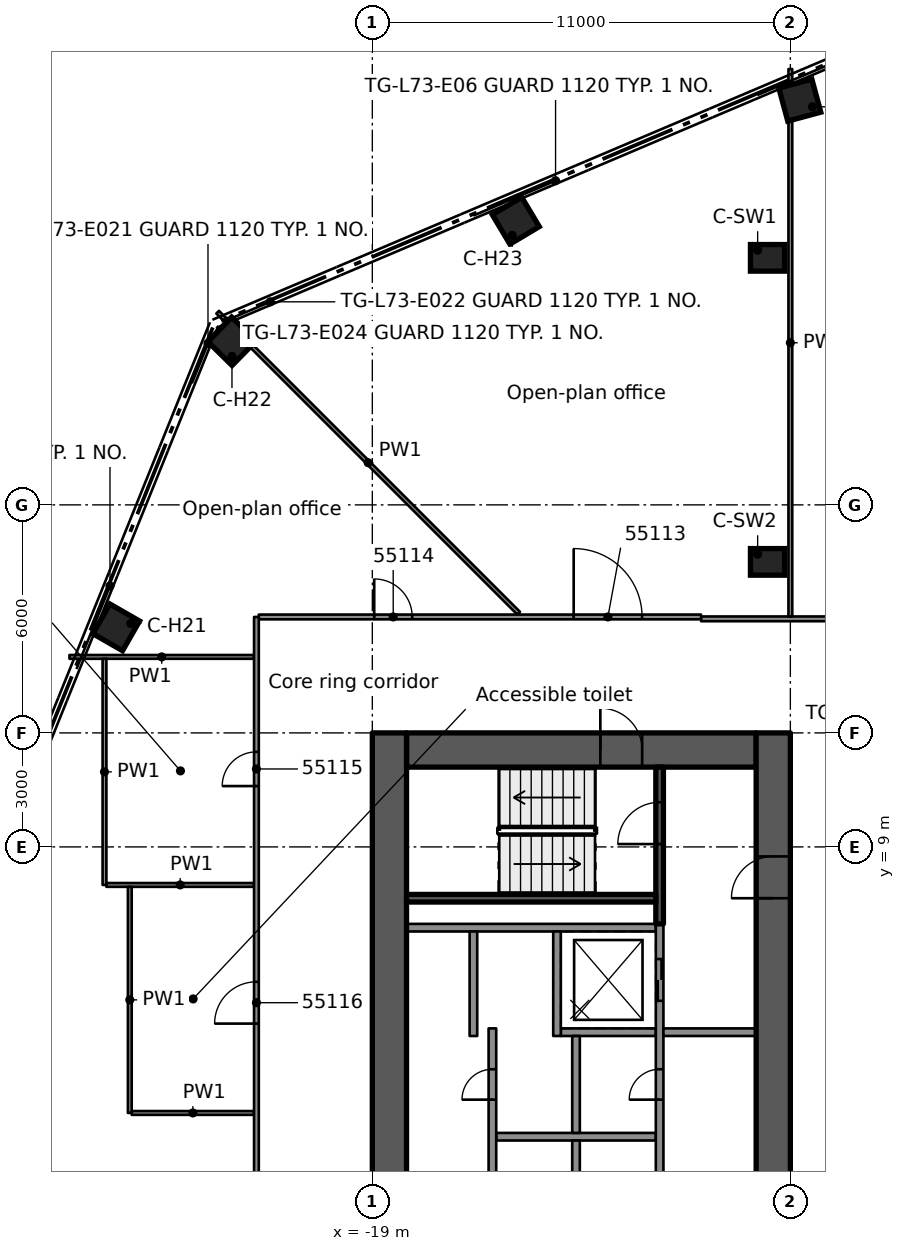
"""IFC4 building model, lengths in metres.
Left out: names, types, materials, properties, quantities, classifications, styles, units other than length and angle.
Written with IfcOpenShell. Run it as: python <this file> out.ifc"""

import sys

from ifc_helpers import new_model, si_unit, direction, frame, frame_2d, origin, origin_2d, place, context, subcontext, project, spatial, rectangle, extrude, element, fill, save


model = new_model("IFC4")
c1 = context("Model", 3, precision=1e-05, world=origin(), true_north=direction((0.0, 1.0)))
c2 = subcontext(c1, "Body", "Model", "MODEL_VIEW")
j1 = project(units=[si_unit("LENGTHUNIT", "METRE"), si_unit("PLANEANGLEUNIT", "RADIAN")], contexts=[c1])
p1 = place(None, origin())
s1 = spatial("IfcSite", under=j1, at=p1, CompositionType="ELEMENT")
p2 = place(p1, origin())
s2 = spatial("IfcBuilding", under=s1, at=p2, CompositionType="ELEMENT")
p3 = place(p2, frame((0.0, 0.0, 275.4)))
s3 = spatial("IfcBuildingStorey", under=s2, at=p3, CompositionType="ELEMENT", Elevation=275.4)
p4 = place(p3, frame((-18.1, 11.55, 0.0), z_axis=(0.0, 0.0, 1.0), x_axis=(1.0, 0.0, 0.0)))
e1 = element("IfcWall", 1, at=p4, inside=s3, PredefinedType="SHEAR", context=c2, shape_type="SweptSolid", body=[
    extrude(rectangle(XDim=9.2, YDim=0.9, at=frame_2d((4.6, 0.0))), origin(), (0.0, 0.0, 1.0), 3.5),
])
p5 = place(p4, frame((5.1, 0.0, 0.0)))
e2 = element("IfcOpeningElement", 2, at=p5, cuts=e1, PredefinedType="OPENING", context=c2, shape_type="SweptSolid", body=[
    extrude(rectangle(XDim=1.1, YDim=2.1, at=frame_2d((0.55, 1.05))), frame((0.0, 0.46, 0.0), z_axis=(0.0, -1.0, 0.0), x_axis=(1.0, 0.0, 0.0)), (0.0, 0.0, 1.0), 0.92),
])
p6 = place(p3, frame((-18.55, -12.0, 0.0), z_axis=(0.0, 0.0, 1.0), x_axis=(0.0, 1.0, 0.0)))
e3 = element("IfcWall", 3, at=p6, inside=s3, PredefinedType="SHEAR", context=c2, shape_type="SweptSolid", body=[
    extrude(rectangle(XDim=24.0, YDim=0.9, at=frame_2d((12.0, 0.0))), origin(), (0.0, 0.0, 1.0), 3.5),
])
p7 = place(p6, frame((10.1, 0.0, 0.0)))
e4 = element("IfcOpeningElement", 4, at=p7, cuts=e3, PredefinedType="OPENING", context=c2, shape_type="SweptSolid", body=[
    extrude(rectangle(XDim=1.8, YDim=2.1, at=frame_2d((0.9, 1.05))), frame((0.0, 0.46, 0.0), z_axis=(0.0, -1.0, 0.0), x_axis=(1.0, 0.0, 0.0)), (0.0, 0.0, 1.0), 0.92),
])
p8 = place(p3, frame((-8.45, -12.0, 0.0), z_axis=(0.0, 0.0, 1.0), x_axis=(0.0, 1.0, 0.0)))
e5 = element("IfcWall", 5, at=p8, inside=s3, PredefinedType="SHEAR", context=c2, shape_type="SweptSolid", body=[
    extrude(rectangle(XDim=24.0, YDim=0.9, at=frame_2d((12.0, 0.0))), origin(), (0.0, 0.0, 1.0), 3.5),
])
p9 = place(p8, frame((9.6, 0.0, 0.0)))
e6 = element("IfcOpeningElement", 6, at=p9, cuts=e5, PredefinedType="OPENING", context=c2, shape_type="SweptSolid", body=[
    extrude(rectangle(XDim=1.8, YDim=2.1, at=frame_2d((0.9, 1.05))), frame((0.0, 0.46, 0.0), z_axis=(0.0, -1.0, 0.0), x_axis=(1.0, 0.0, 0.0)), (0.0, 0.0, 1.0), 0.92),
])
p10 = place(p8, frame((19.65, 0.0, 0.0)))
e7 = element("IfcOpeningElement", 7, at=p10, cuts=e5, PredefinedType="OPENING", context=c2, shape_type="SweptSolid", body=[
    extrude(rectangle(XDim=1.1, YDim=2.1, at=frame_2d((0.55, 1.05))), frame((0.0, 0.46, 0.0), z_axis=(0.0, -1.0, 0.0), x_axis=(1.0, 0.0, 0.0)), (0.0, 0.0, 1.0), 0.92),
])
p11 = place(p8, frame((2.2, 0.0, 0.0)))
e8 = element("IfcOpeningElement", 8, at=p11, cuts=e5, PredefinedType="OPENING", context=c2, shape_type="SweptSolid", body=[
    extrude(rectangle(XDim=0.8, YDim=2.1, at=frame_2d((0.4, 1.05))), frame((0.0, 0.46, 0.0), z_axis=(0.0, -1.0, 0.0), x_axis=(1.0, 0.0, 0.0)), (0.0, 0.0, 1.0), 0.92),
])
for number, where, z_axis, x_axis in (
    (9, (-25.739, 14.777, 0.0), (0.0, 0.0, 1.0), (-0.867, 0.498, 0.0)),
    (10, (-22.697, 22.305, 0.0), (0.0, 0.0, 1.0), (-0.713, 0.701, 0.0)),
    (11, (-15.224, 25.477, 0.0), (0.0, 0.0, 1.0), (-0.513, 0.858, 0.0)),
    (12, (-7.751, 28.649, 0.0), (0.0, 0.0, 1.0), (-0.261, 0.965, 0.0)),
):
    element("IfcColumn", number, at=place(p3, frame(where, z_axis=z_axis, x_axis=x_axis)), inside=s3, PredefinedType="COLUMN", context=c2, shape_type="SweptSolid", body=[
        extrude(rectangle(XDim=0.9, YDim=0.9, at=origin_2d()), origin(), (0.0, 0.0, 1.0), 3.5),
    ])
for number, where, z_axis, x_axis in (
    (13, (-8.6, 24.5, 0.0), (0.0, 0.0, 1.0), (1.0, 0.0, 0.0)),
    (14, (-8.6, 16.5, 0.0), (0.0, 0.0, 1.0), (1.0, 0.0, 0.0)),
):
    element("IfcColumn", number, at=place(p3, frame(where, z_axis=z_axis, x_axis=x_axis)), inside=s3, PredefinedType="COLUMN", context=c2, shape_type="SweptSolid", body=[
        extrude(rectangle(XDim=0.9, YDim=0.7, at=origin_2d()), origin(), (0.0, 0.0, 1.0), 3.5),
    ])
p12 = place(p3, frame((-11.54, 6.875, 0.0), z_axis=(0.0, 0.0, 1.0), x_axis=(-1.0, 0.0, 0.0)))
e15 = element("IfcWall", 15, at=p12, inside=s3, PredefinedType="SOLIDWALL", context=c2, shape_type="SweptSolid", body=[
    extrude(rectangle(XDim=6.56, YDim=0.2, at=frame_2d((3.28, 0.0))), origin(), (0.0, 0.0, 1.0), 3.09),
])
p13 = place(p3, frame((-11.54, 1.375, 0.0), z_axis=(0.0, 0.0, 1.0), x_axis=(-1.0, 0.0, 0.0)))
e16 = element("IfcWall", 16, at=p13, inside=s3, PredefinedType="SOLIDWALL", context=c2, shape_type="SweptSolid", body=[
    extrude(rectangle(XDim=4.2, YDim=0.2, at=frame_2d((2.1, 0.0))), origin(), (0.0, 0.0, 1.0), 3.09),
])
p14 = place(p3, frame((-11.54, 4.125, 0.0), z_axis=(0.0, 0.0, 1.0), x_axis=(-1.0, 0.0, 0.0)))
e17 = element("IfcWall", 17, at=p14, inside=s3, PredefinedType="SOLIDWALL", context=c2, shape_type="SweptSolid", body=[
    extrude(rectangle(XDim=2.5, YDim=0.2, at=frame_2d((1.25, 0.0))), origin(), (0.0, 0.0, 1.0), 3.09),
])
p15 = place(p3, frame((-11.44, -6.975, 0.0), z_axis=(0.0, 0.0, 1.0), x_axis=(0.0, 1.0, 0.0)))
e18 = element("IfcWall", 18, at=p15, inside=s3, PredefinedType="SOLIDWALL", context=c2, shape_type="SweptSolid", body=[
    extrude(rectangle(XDim=13.95, YDim=0.2, at=frame_2d((6.975, 0.0))), origin(), (0.0, 0.0, 1.0), 3.09),
])
p16 = place(p15, frame((0.925, 0.0, 0.0)))
e19 = element("IfcOpeningElement", 19, at=p16, cuts=e18, PredefinedType="OPENING", context=c2, shape_type="SweptSolid", body=[
    extrude(rectangle(XDim=1.1, YDim=2.1, at=frame_2d((0.55, 1.05))), frame((0.0, 0.11, 0.0), z_axis=(0.0, -1.0, 0.0), x_axis=(1.0, 0.0, 0.0)), (0.0, 0.0, 1.0), 0.22),
])
p17 = place(p15, frame((3.675, 0.0, 0.0)))
e20 = element("IfcOpeningElement", 20, at=p17, cuts=e18, PredefinedType="OPENING", context=c2, shape_type="SweptSolid", body=[
    extrude(rectangle(XDim=1.1, YDim=2.1, at=frame_2d((0.55, 1.05))), frame((0.0, 0.11, 0.0), z_axis=(0.0, -1.0, 0.0), x_axis=(1.0, 0.0, 0.0)), (0.0, 0.0, 1.0), 0.22),
])
p18 = place(p15, frame((11.925, 0.0, 0.0)))
e21 = element("IfcOpeningElement", 21, at=p18, cuts=e18, PredefinedType="OPENING", context=c2, shape_type="SweptSolid", body=[
    extrude(rectangle(XDim=1.1, YDim=2.1, at=frame_2d((0.55, 1.05))), frame((0.0, 0.11, 0.0), z_axis=(0.0, -1.0, 0.0), x_axis=(1.0, 0.0, 0.0)), (0.0, 0.0, 1.0), 0.22),
])
p19 = place(p15, frame((6.575, 0.0, 0.0)))
e22 = element("IfcOpeningElement", 22, at=p19, cuts=e18, PredefinedType="OPENING", context=c2, shape_type="SweptSolid", body=[
    extrude(rectangle(XDim=0.8, YDim=2.1, at=frame_2d((0.4, 1.05))), frame((0.0, 0.11, 0.0), z_axis=(0.0, -1.0, 0.0), x_axis=(1.0, 0.0, 0.0)), (0.0, 0.0, 1.0), 0.22),
])
p20 = place(p15, frame((9.325, 0.0, 0.0)))
e23 = element("IfcOpeningElement", 23, at=p20, cuts=e18, PredefinedType="OPENING", context=c2, shape_type="SweptSolid", body=[
    extrude(rectangle(XDim=0.8, YDim=2.1, at=frame_2d((0.4, 1.05))), frame((0.0, 0.11, 0.0), z_axis=(0.0, -1.0, 0.0), x_axis=(1.0, 0.0, 0.0)), (0.0, 0.0, 1.0), 0.22),
])
p21 = place(p3, frame((-13.64, -4.025, 0.0), z_axis=(0.0, 0.0, 1.0), x_axis=(0.0, 1.0, 0.0)))
e24 = element("IfcWall", 24, at=p21, inside=s3, PredefinedType="SOLIDWALL", context=c2, shape_type="SweptSolid", body=[
    extrude(rectangle(XDim=5.3, YDim=0.2, at=frame_2d((2.65, 0.0))), origin(), (0.0, 0.0, 1.0), 3.09),
])
p22 = place(p3, frame((-13.64, 1.475, 0.0), z_axis=(0.0, 0.0, 1.0), x_axis=(0.0, 1.0, 0.0)))
e25 = element("IfcWall", 25, at=p22, inside=s3, PredefinedType="SOLIDWALL", context=c2, shape_type="SweptSolid", body=[
    extrude(rectangle(XDim=2.55, YDim=0.2, at=frame_2d((1.275, 0.0))), origin(), (0.0, 0.0, 1.0), 3.09),
])
p23 = place(p3, frame((-14.14, 4.025, 0.0), z_axis=(0.0, 0.0, 1.0), x_axis=(0.0, 1.0, 0.0)))
e26 = element("IfcWall", 26, at=p23, inside=s3, PredefinedType="SOLIDWALL", context=c2, shape_type="SweptSolid", body=[
    extrude(rectangle(XDim=2.75, YDim=0.2, at=frame_2d((1.375, 0.0))), origin(), (0.0, 0.0, 1.0), 3.09),
])
p24 = place(p3, frame((-15.84, -4.025, 0.0), z_axis=(0.0, 0.0, 1.0), x_axis=(0.0, 1.0, 0.0)))
e27 = element("IfcWall", 27, at=p24, inside=s3, PredefinedType="SOLIDWALL", context=c2, shape_type="SweptSolid", body=[
    extrude(rectangle(XDim=8.25, YDim=0.2, at=frame_2d((4.125, 0.0))), origin(), (0.0, 0.0, 1.0), 3.09),
])
p25 = place(p24, frame((0.875, 0.0, 0.0)))
e28 = element("IfcOpeningElement", 28, at=p25, cuts=e27, PredefinedType="OPENING", context=c2, shape_type="SweptSolid", body=[
    extrude(rectangle(XDim=0.8, YDim=2.1, at=frame_2d((0.4, 1.05))), frame((0.0, 0.11, 0.0), z_axis=(0.0, -1.0, 0.0), x_axis=(1.0, 0.0, 0.0)), (0.0, 0.0, 1.0), 0.22),
])
p26 = place(p24, frame((6.375, 0.0, 0.0)))
e29 = element("IfcOpeningElement", 29, at=p26, cuts=e27, PredefinedType="OPENING", context=c2, shape_type="SweptSolid", body=[
    extrude(rectangle(XDim=0.8, YDim=2.1, at=frame_2d((0.4, 1.05))), frame((0.0, 0.11, 0.0), z_axis=(0.0, -1.0, 0.0), x_axis=(1.0, 0.0, 0.0)), (0.0, 0.0, 1.0), 0.22),
])
p27 = place(p3, frame((-16.34, 4.025, 0.0), z_axis=(0.0, 0.0, 1.0), x_axis=(0.0, 1.0, 0.0)))
e30 = element("IfcWall", 30, at=p27, inside=s3, PredefinedType="SOLIDWALL", context=c2, shape_type="SweptSolid", body=[
    extrude(rectangle(XDim=2.75, YDim=0.2, at=frame_2d((1.375, 0.0))), origin(), (0.0, 0.0, 1.0), 3.09),
])
p28 = place(p3, frame((-11.44, 6.975, 0.0), z_axis=(0.0, 0.0, 1.0), x_axis=(0.0, 1.0, 0.0)))
e31 = element("IfcWall", 31, at=p28, inside=s3, PredefinedType="SOLIDWALL", context=c2, shape_type="SweptSolid", body=[
    extrude(rectangle(XDim=4.125, YDim=0.2, at=frame_2d((2.062, 0.0))), origin(), (0.0, 0.0, 1.0), 3.09),
])
p29 = place(p28, frame((2.1, 0.0, 0.0)))
e32 = element("IfcOpeningElement", 32, at=p29, cuts=e31, PredefinedType="OPENING", context=c2, shape_type="SweptSolid", body=[
    extrude(rectangle(XDim=1.1, YDim=2.1, at=frame_2d((0.55, 1.05))), frame((0.0, 0.11, 0.0), z_axis=(0.0, -1.0, 0.0), x_axis=(1.0, 0.0, 0.0)), (0.0, 0.0, 1.0), 0.22),
])
p30 = place(p3, frame((-11.54, 7.65, 0.0), z_axis=(0.0, 0.0, 1.0), x_axis=(-1.0, 0.0, 0.0)))
e33 = element("IfcWall", 33, at=p30, inside=s3, PredefinedType="SOLIDWALL", context=c2, shape_type="SweptSolid", body=[
    extrude(rectangle(XDim=6.56, YDim=0.2, at=frame_2d((3.28, 0.0))), origin(), (0.0, 0.0, 1.0), 3.09),
])
p31 = place(p3, frame((-8.9, 4.125, 0.0), z_axis=(0.0, 0.0, 1.0), x_axis=(-1.0, 0.0, 0.0)))
e34 = element("IfcWall", 34, at=p31, inside=s3, PredefinedType="PARTITIONING", context=c2, shape_type="SweptSolid", body=[
    extrude(rectangle(XDim=2.44, YDim=0.2, at=frame_2d((1.22, 0.0))), origin(), (0.0, 0.0, 1.0), 3.09),
])
p32 = place(p3, frame((-23.07, 23.07, 0.0), z_axis=(0.0, 0.0, 1.0), x_axis=(0.707106781187, -0.707106781187, 0.0)))
e35 = element("IfcWall", 35, at=p32, inside=s3, PredefinedType="PARTITIONING", context=c2, shape_type="SweptSolid", body=[
    extrude(rectangle(XDim=11.202, YDim=0.1, at=frame_2d((5.601, 0.0))), origin(), (0.0, 0.0, 1.0), 3.08),
])
p33 = place(p3, frame((-25.331, 2.0, 0.0), z_axis=(0.0, 0.0, 1.0), x_axis=(1.0, 0.0, 0.0)))
e36 = element("IfcWall", 36, at=p33, inside=s3, PredefinedType="PARTITIONING", context=c2, shape_type="SweptSolid", body=[
    extrude(rectangle(XDim=3.218, YDim=0.1, at=frame_2d((1.609, 0.0))), origin(), (0.0, 0.0, 1.0), 3.08),
])
p34 = place(p3, frame((-25.998, 8.0, 0.0), z_axis=(0.0, 0.0, 1.0), x_axis=(1.0, 0.0, 0.0)))
e37 = element("IfcWall", 37, at=p34, inside=s3, PredefinedType="PARTITIONING", context=c2, shape_type="SweptSolid", body=[
    extrude(rectangle(XDim=3.885, YDim=0.1, at=frame_2d((1.942, 0.0))), origin(), (0.0, 0.0, 1.0), 3.08),
])
p35 = place(p3, frame((-26.97, 14.0, 0.0), z_axis=(0.0, 0.0, 1.0), x_axis=(1.0, 0.0, 0.0)))
e38 = element("IfcWall", 38, at=p35, inside=s3, PredefinedType="PARTITIONING", context=c2, shape_type="SweptSolid", body=[
    extrude(rectangle(XDim=4.857, YDim=0.1, at=frame_2d((2.428, 0.0))), origin(), (0.0, 0.0, 1.0), 3.08),
])
p36 = place(p3, frame((-10.349, 15.001, 0.0), z_axis=(0.0, 0.0, 1.0), x_axis=(1.0, 0.0, 0.0)))
e39 = element("IfcWall", 39, at=p36, inside=s3, PredefinedType="PARTITIONING", context=c2, shape_type="SweptSolid", body=[
    extrude(rectangle(XDim=21.339, YDim=0.125, at=frame_2d((10.669, 0.0))), origin(), (0.0, 0.0, 1.0), 3.08),
])
p37 = place(p36, frame((13.449, 0.0, 0.0)))
e40 = element("IfcOpeningElement", 40, at=p37, cuts=e39, PredefinedType="OPENING", context=c2, shape_type="SweptSolid", body=[
    extrude(rectangle(XDim=1.8, YDim=2.1, at=frame_2d((0.9, 1.05))), frame((0.0, 0.073, 0.0), z_axis=(0.0, -1.0, 0.0), x_axis=(1.0, 0.0, 0.0)), (0.0, 0.0, 1.0), 0.145),
])
p38 = place(p36, frame((5.449, 0.0, 0.0)))
e41 = element("IfcOpeningElement", 41, at=p38, cuts=e39, PredefinedType="OPENING", context=c2, shape_type="SweptSolid", body=[
    extrude(rectangle(XDim=1.8, YDim=2.1, at=frame_2d((0.9, 1.05))), frame((0.0, 0.073, 0.0), z_axis=(0.0, -1.0, 0.0), x_axis=(1.0, 0.0, 0.0)), (0.0, 0.0, 1.0), 0.145),
])
p39 = place(p3, frame((-21.988, 15.051, 0.0), z_axis=(0.0, 0.0, 1.0), x_axis=(1.0, 0.0, 0.0)))
e42 = element("IfcWall", 42, at=p39, inside=s3, PredefinedType="PARTITIONING", context=c2, shape_type="SweptSolid", body=[
    extrude(rectangle(XDim=11.638, YDim=0.125, at=frame_2d((5.819, 0.0))), origin(), (0.0, 0.0, 1.0), 3.08),
])
p40 = place(p39, frame((8.287, 0.0, 0.0)))
e43 = element("IfcOpeningElement", 43, at=p40, cuts=e42, PredefinedType="OPENING", context=c2, shape_type="SweptSolid", body=[
    extrude(rectangle(XDim=1.8, YDim=2.1, at=frame_2d((0.9, 1.05))), frame((0.0, 0.073, 0.0), z_axis=(0.0, -1.0, 0.0), x_axis=(1.0, 0.0, 0.0)), (0.0, 0.0, 1.0), 0.145),
])
p41 = place(p39, frame((3.038, 0.0, 0.0)))
e44 = element("IfcOpeningElement", 44, at=p41, cuts=e42, PredefinedType="OPENING", context=c2, shape_type="SweptSolid", body=[
    extrude(rectangle(XDim=1.0, YDim=2.1, at=frame_2d((0.5, 1.05))), frame((0.0, 0.073, 0.0), z_axis=(0.0, -1.0, 0.0), x_axis=(1.0, 0.0, 0.0)), (0.0, 0.0, 1.0), 0.145),
])
p42 = place(p3, frame((-8.0, 15.063, 0.0), z_axis=(0.0, 0.0, 1.0), x_axis=(0.0, 1.0, 0.0)))
e45 = element("IfcWall", 45, at=p42, inside=s3, PredefinedType="PARTITIONING", context=c2, shape_type="SweptSolid", body=[
    extrude(rectangle(XDim=14.404, YDim=0.1, at=frame_2d((7.202, 0.0))), origin(), (0.0, 0.0, 1.0), 3.08),
])
p43 = place(p3, frame((-22.05, -15.051, 0.0), z_axis=(0.0, 0.0, 1.0), x_axis=(0.0, 1.0, 0.0)))
e46 = element("IfcWall", 46, at=p43, inside=s3, PredefinedType="PARTITIONING", context=c2, shape_type="SweptSolid", body=[
    extrude(rectangle(XDim=30.102, YDim=0.125, at=frame_2d((15.051, 0.0))), origin(), (0.0, 0.0, 1.0), 3.08),
])
p44 = place(p43, frame((8.151, 0.0, 0.0)))
e47 = element("IfcOpeningElement", 47, at=p44, cuts=e46, PredefinedType="OPENING", context=c2, shape_type="SweptSolid", body=[
    extrude(rectangle(XDim=1.8, YDim=2.1, at=frame_2d((0.9, 1.05))), frame((0.0, 0.073, 0.0), z_axis=(0.0, -1.0, 0.0), x_axis=(1.0, 0.0, 0.0)), (0.0, 0.0, 1.0), 0.145),
])
p45 = place(p43, frame((25.652, 0.0, 0.0)))
e48 = element("IfcOpeningElement", 48, at=p45, cuts=e46, PredefinedType="OPENING", context=c2, shape_type="SweptSolid", body=[
    extrude(rectangle(XDim=0.9, YDim=2.1, at=frame_2d((0.45, 1.05))), frame((0.0, 0.073, 0.0), z_axis=(0.0, -1.0, 0.0), x_axis=(1.0, 0.0, 0.0)), (0.0, 0.0, 1.0), 0.145),
])
p46 = place(p43, frame((19.402, 0.0, 0.0)))
e49 = element("IfcOpeningElement", 49, at=p46, cuts=e46, PredefinedType="OPENING", context=c2, shape_type="SweptSolid", body=[
    extrude(rectangle(XDim=1.1, YDim=2.1, at=frame_2d((0.55, 1.05))), frame((0.0, 0.073, 0.0), z_axis=(0.0, -1.0, 0.0), x_axis=(1.0, 0.0, 0.0)), (0.0, 0.0, 1.0), 0.145),
])
p47 = place(p3, frame((-25.382, 2.001, 0.0), z_axis=(0.0, 0.0, 1.0), x_axis=(0.0, 1.0, 0.0)))
e50 = element("IfcWall", 50, at=p47, inside=s3, PredefinedType="PARTITIONING", context=c2, shape_type="SweptSolid", body=[
    extrude(rectangle(XDim=5.949, YDim=0.1, at=frame_2d((2.975, 0.0))), origin(), (0.0, 0.0, 1.0), 3.08),
])
p48 = place(p3, frame((-26.048, 8.0, 0.0), z_axis=(0.0, 0.0, 1.0), x_axis=(0.0, 1.0, 0.0)))
e51 = element("IfcWall", 51, at=p48, inside=s3, PredefinedType="PARTITIONING", context=c2, shape_type="SweptSolid", body=[
    extrude(rectangle(XDim=5.95, YDim=0.1, at=frame_2d((2.975, 0.0))), origin(), (0.0, 0.0, 1.0), 3.08),
])
p49 = place(p18, origin())
e52 = element("IfcDoor", 52, at=p49, inside=s3, OperationType="DOUBLE_DOOR_SLIDING", PredefinedType="DOOR", context=c2, shape_type="SweptSolid", body=[
    extrude(rectangle(XDim=1.1, YDim=2.1, at=frame_2d((0.55, 1.05))), frame((0.0, 0.025, 0.0), z_axis=(0.0, -1.0, 0.0), x_axis=(1.0, 0.0, 0.0)), (0.0, 0.0, 1.0), 0.05),
])
fill(e21, e52)
p50 = place(p20, origin())
e53 = element("IfcDoor", 53, at=p50, inside=s3, OperationType="SINGLE_SWING_LEFT", PredefinedType="DOOR", context=c2, shape_type="SweptSolid", body=[
    extrude(rectangle(XDim=0.8, YDim=2.1, at=frame_2d((0.4, 1.05))), frame((0.0, 0.025, 0.0), z_axis=(0.0, -1.0, 0.0), x_axis=(1.0, 0.0, 0.0)), (0.0, 0.0, 1.0), 0.05),
])
fill(e23, e53)
p51 = place(p26, origin())
e54 = element("IfcDoor", 54, at=p51, inside=s3, OperationType="SINGLE_SWING_LEFT", PredefinedType="DOOR", context=c2, shape_type="SweptSolid", body=[
    extrude(rectangle(XDim=0.8, YDim=2.1, at=frame_2d((0.4, 1.05))), frame((0.0, 0.025, 0.0), z_axis=(0.0, -1.0, 0.0), x_axis=(1.0, 0.0, 0.0)), (0.0, 0.0, 1.0), 0.05),
])
fill(e29, e54)
p52 = place(p10, origin())
e55 = element("IfcDoor", 55, at=p52, inside=s3, OperationType="SINGLE_SWING_RIGHT", PredefinedType="DOOR", context=c2, shape_type="SweptSolid", body=[
    extrude(rectangle(XDim=1.1, YDim=2.1, at=frame_2d((0.55, 1.05))), frame((0.0, 0.025, 0.0), z_axis=(0.0, -1.0, 0.0), x_axis=(1.0, 0.0, 0.0)), (0.0, 0.0, 1.0), 0.05),
])
fill(e7, e55)
p53 = place(p5, origin())
e56 = element("IfcDoor", 56, at=p53, inside=s3, OperationType="SINGLE_SWING_RIGHT", PredefinedType="DOOR", context=c2, shape_type="SweptSolid", body=[
    extrude(rectangle(XDim=1.1, YDim=2.1, at=frame_2d((0.55, 1.05))), frame((0.0, 0.025, 0.0), z_axis=(0.0, -1.0, 0.0), x_axis=(1.0, 0.0, 0.0)), (0.0, 0.0, 1.0), 0.05),
])
fill(e2, e56)
p54 = place(p29, origin())
e57 = element("IfcDoor", 57, at=p54, inside=s3, OperationType="SINGLE_SWING_RIGHT", PredefinedType="DOOR", context=c2, shape_type="SweptSolid", body=[
    extrude(rectangle(XDim=1.1, YDim=2.1, at=frame_2d((0.55, 1.05))), frame((0.0, 0.025, 0.0), z_axis=(0.0, -1.0, 0.0), x_axis=(1.0, 0.0, 0.0)), (0.0, 0.0, 1.0), 0.05),
])
fill(e32, e57)
p55 = place(p40, origin())
e58 = element("IfcDoor", 58, at=p55, inside=s3, OperationType="DOUBLE_DOOR_SINGLE_SWING", PredefinedType="DOOR", context=c2, shape_type="SweptSolid", body=[
    extrude(rectangle(XDim=1.8, YDim=2.1, at=frame_2d((0.9, 1.05))), frame((0.0, 0.025, 0.0), z_axis=(0.0, -1.0, 0.0), x_axis=(1.0, 0.0, 0.0)), (0.0, 0.0, 1.0), 0.05),
])
fill(e43, e58)
p56 = place(p41, origin())
e59 = element("IfcDoor", 59, at=p56, inside=s3, OperationType="SINGLE_SWING_LEFT", PredefinedType="DOOR", context=c2, shape_type="SweptSolid", body=[
    extrude(rectangle(XDim=1.0, YDim=2.1, at=frame_2d((0.5, 1.05))), frame((0.0, 0.025, 0.0), z_axis=(0.0, -1.0, 0.0), x_axis=(1.0, 0.0, 0.0)), (0.0, 0.0, 1.0), 0.05),
])
fill(e44, e59)
p57 = place(p45, origin())
e60 = element("IfcDoor", 60, at=p57, inside=s3, OperationType="SINGLE_SWING_RIGHT", PredefinedType="DOOR", context=c2, shape_type="SweptSolid", body=[
    extrude(rectangle(XDim=0.9, YDim=2.1, at=frame_2d((0.45, 1.05))), frame((0.0, 0.025, 0.0), z_axis=(0.0, -1.0, 0.0), x_axis=(1.0, 0.0, 0.0)), (0.0, 0.0, 1.0), 0.05),
])
fill(e48, e60)
p58 = place(p46, origin())
e61 = element("IfcDoor", 61, at=p58, inside=s3, OperationType="SINGLE_SWING_RIGHT", PredefinedType="DOOR", context=c2, shape_type="SweptSolid", body=[
    extrude(rectangle(XDim=1.1, YDim=2.1, at=frame_2d((0.55, 1.05))), frame((0.0, 0.025, 0.0), z_axis=(0.0, -1.0, 0.0), x_axis=(1.0, 0.0, 0.0)), (0.0, 0.0, 1.0), 0.05),
])
fill(e49, e61)
save(model, sys.argv[1])
